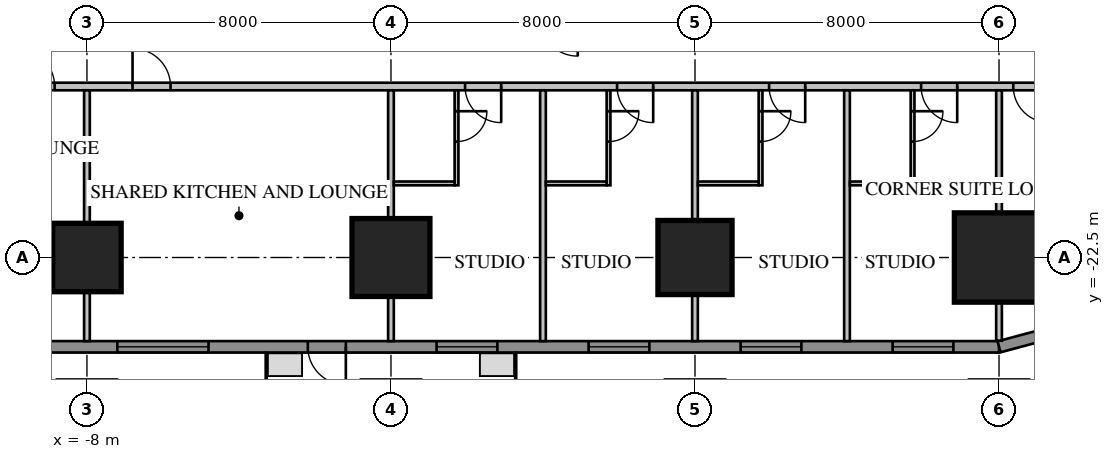
"""IFC4 building model, lengths in metres.
Left out: names, types, materials, properties, quantities, classifications, styles, units other than length and angle.
Written with IfcOpenShell. Run it as: python <this file> out.ifc"""

import sys

from ifc_helpers import new_model, si_unit, direction, frame, frame_2d, origin, origin_2d, place, context, subcontext, project, spatial, rectangle, extrude, element, fill, save


model = new_model("IFC4")
c1 = context("Model", 3, precision=1e-05, world=origin(), true_north=direction((0.0, 1.0)))
c2 = subcontext(c1, "Body", "Model", "MODEL_VIEW")
j1 = project(units=[si_unit("LENGTHUNIT", "METRE"), si_unit("PLANEANGLEUNIT", "RADIAN")], contexts=[c1])
p1 = place(None, origin())
s1 = spatial("IfcSite", under=j1, at=p1, CompositionType="ELEMENT")
p2 = place(p1, origin())
s2 = spatial("IfcBuilding", under=s1, at=p2, CompositionType="ELEMENT")
p3 = place(p2, frame((0.0, 0.0, 42.95)))
s3 = spatial("IfcBuildingStorey", under=s2, at=p3, CompositionType="ELEMENT", Elevation=42.95)
p4 = place(p3, frame((-8.0, -22.5, 0.0), z_axis=(0.0, 0.0, 1.0), x_axis=(1.0, 0.0, 0.0)))
e1 = element("IfcColumn", 1, at=p4, inside=s3, PredefinedType="COLUMN", context=c2, shape_type="SweptSolid", body=[
    extrude(rectangle(XDim=1.8, YDim=1.8, at=origin_2d()), origin(), (0.0, 0.0, 1.0), 3.85),
])
p5 = place(p3, frame((0.0, -22.5, 0.0), z_axis=(0.0, 0.0, 1.0), x_axis=(1.0, 0.0, 0.0)))
e2 = element("IfcColumn", 2, at=p5, inside=s3, PredefinedType="COLUMN", context=c2, shape_type="SweptSolid", body=[
    extrude(rectangle(XDim=2.05, YDim=2.05, at=origin_2d()), origin(), (0.0, 0.0, 1.0), 3.85),
])
p6 = place(p3, frame((8.0, -22.5, 0.0), z_axis=(0.0, 0.0, 1.0), x_axis=(1.0, 0.0, 0.0)))
e3 = element("IfcColumn", 3, at=p6, inside=s3, PredefinedType="COLUMN", context=c2, shape_type="SweptSolid", body=[
    extrude(rectangle(XDim=1.95, YDim=1.95, at=origin_2d()), origin(), (0.0, 0.0, 1.0), 3.85),
])
p7 = place(p3, frame((16.0, -22.5, 0.0), z_axis=(0.0, 0.0, 1.0), x_axis=(1.0, 0.0, 0.0)))
e4 = element("IfcColumn", 4, at=p7, inside=s3, PredefinedType="COLUMN", context=c2, shape_type="SweptSolid", body=[
    extrude(rectangle(XDim=2.35, YDim=2.35, at=origin_2d()), origin(), (0.0, 0.0, 1.0), 3.85),
])
p8 = place(p3, frame((-16.0, -24.85, 0.0), z_axis=(0.0, 0.0, 1.0), x_axis=(1.0, 0.0, 0.0)))
e5 = element("IfcWall", 5, at=p8, inside=s3, PredefinedType="SOLIDWALL", context=c2, shape_type="SweptSolid", body=[
    extrude(rectangle(XDim=32.0, YDim=0.3, at=frame_2d((16.0, 0.0))), origin(), (0.0, 0.0, 1.0), 3.65),
])
p9 = place(p8, frame((1.2, 0.0, 0.75)))
e6 = element("IfcOpeningElement", 6, at=p9, cuts=e5, PredefinedType="OPENING", context=c2, shape_type="SweptSolid", body=[
    extrude(rectangle(XDim=1.6, YDim=1.8, at=frame_2d((0.8, 0.9))), frame((0.0, 0.17, 0.0), z_axis=(0.0, -1.0, 0.0), x_axis=(1.0, 0.0, 0.0)), (0.0, 0.0, 1.0), 0.34),
])
p10 = place(p8, frame((5.2, 0.0, 0.75)))
e7 = element("IfcOpeningElement", 7, at=p10, cuts=e5, PredefinedType="OPENING", context=c2, shape_type="SweptSolid", body=[
    extrude(rectangle(XDim=1.6, YDim=1.8, at=frame_2d((0.8, 0.9))), frame((0.0, 0.17, 0.0), z_axis=(0.0, -1.0, 0.0), x_axis=(1.0, 0.0, 0.0)), (0.0, 0.0, 1.0), 0.34),
])
p11 = place(p8, frame((17.2, 0.0, 0.75)))
e8 = element("IfcOpeningElement", 8, at=p11, cuts=e5, PredefinedType="OPENING", context=c2, shape_type="SweptSolid", body=[
    extrude(rectangle(XDim=1.6, YDim=1.8, at=frame_2d((0.8, 0.9))), frame((0.0, 0.17, 0.0), z_axis=(0.0, -1.0, 0.0), x_axis=(1.0, 0.0, 0.0)), (0.0, 0.0, 1.0), 0.34),
])
p12 = place(p8, frame((21.2, 0.0, 0.75)))
e9 = element("IfcOpeningElement", 9, at=p12, cuts=e5, PredefinedType="OPENING", context=c2, shape_type="SweptSolid", body=[
    extrude(rectangle(XDim=1.6, YDim=1.8, at=frame_2d((0.8, 0.9))), frame((0.0, 0.17, 0.0), z_axis=(0.0, -1.0, 0.0), x_axis=(1.0, 0.0, 0.0)), (0.0, 0.0, 1.0), 0.34),
])
p13 = place(p8, frame((25.2, 0.0, 0.75)))
e10 = element("IfcOpeningElement", 10, at=p13, cuts=e5, PredefinedType="OPENING", context=c2, shape_type="SweptSolid", body=[
    extrude(rectangle(XDim=1.6, YDim=1.8, at=frame_2d((0.8, 0.9))), frame((0.0, 0.17, 0.0), z_axis=(0.0, -1.0, 0.0), x_axis=(1.0, 0.0, 0.0)), (0.0, 0.0, 1.0), 0.34),
])
p14 = place(p8, frame((29.2, 0.0, 0.75)))
e11 = element("IfcOpeningElement", 11, at=p14, cuts=e5, PredefinedType="OPENING", context=c2, shape_type="SweptSolid", body=[
    extrude(rectangle(XDim=1.6, YDim=1.8, at=frame_2d((0.8, 0.9))), frame((0.0, 0.17, 0.0), z_axis=(0.0, -1.0, 0.0), x_axis=(1.0, 0.0, 0.0)), (0.0, 0.0, 1.0), 0.34),
])
p15 = place(p8, frame((8.8, 0.0, 0.75)))
e12 = element("IfcOpeningElement", 12, at=p15, cuts=e5, PredefinedType="OPENING", context=c2, shape_type="SweptSolid", body=[
    extrude(rectangle(XDim=2.4, YDim=1.8, at=frame_2d((1.2, 0.9))), frame((0.0, 0.17, 0.0), z_axis=(0.0, -1.0, 0.0), x_axis=(1.0, 0.0, 0.0)), (0.0, 0.0, 1.0), 0.34),
])
p16 = place(p8, frame((13.812, 0.0, 0.0)))
e13 = element("IfcOpeningElement", 13, at=p16, cuts=e5, PredefinedType="OPENING", context=c2, shape_type="SweptSolid", body=[
    extrude(rectangle(XDim=1.0, YDim=2.4, at=frame_2d((0.5, 1.2))), frame((0.0, 0.17, 0.0), z_axis=(0.0, -1.0, 0.0), x_axis=(1.0, 0.0, 0.0)), (0.0, 0.0, 1.0), 0.34),
])
p17 = place(p3, frame((16.0, -24.85, 0.0), z_axis=(0.0, 0.0, 1.0), x_axis=(0.965920218567, 0.258839972501, 0.0)))
e14 = element("IfcWall", 14, at=p17, inside=s3, PredefinedType="SOLIDWALL", context=c2, shape_type="SweptSolid", body=[
    extrude(rectangle(XDim=4.581, YDim=0.3, at=frame_2d((2.291, 0.0))), origin(), (0.0, 0.0, 1.0), 3.65),
])
p18 = place(p3, frame((-18.0, -18.0, 0.0), z_axis=(0.0, 0.0, 1.0), x_axis=(1.0, 0.0, 0.0)))
e15 = element("IfcWall", 15, at=p18, inside=s3, PredefinedType="PARTITIONING", context=c2, shape_type="SweptSolid", body=[
    extrude(rectangle(XDim=36.0, YDim=0.2, at=frame_2d((18.0, 0.0))), origin(), (0.0, 0.0, 1.0), 3.65),
])
p19 = place(p18, frame((0.375, 0.0, 0.0)))
e16 = element("IfcOpeningElement", 16, at=p19, cuts=e15, PredefinedType="OPENING", context=c2, shape_type="SweptSolid", body=[
    extrude(rectangle(XDim=1.0, YDim=2.1, at=frame_2d((0.5, 1.05))), frame((0.0, 0.12, 0.0), z_axis=(0.0, -1.0, 0.0), x_axis=(1.0, 0.0, 0.0)), (0.0, 0.0, 1.0), 0.24),
])
p20 = place(p18, frame((2.45, 0.0, 0.0)))
e17 = element("IfcOpeningElement", 17, at=p20, cuts=e15, PredefinedType="OPENING", context=c2, shape_type="SweptSolid", body=[
    extrude(rectangle(XDim=0.8, YDim=2.1, at=frame_2d((0.4, 1.05))), frame((0.0, 0.12, 0.0), z_axis=(0.0, -1.0, 0.0), x_axis=(1.0, 0.0, 0.0)), (0.0, 0.0, 1.0), 0.24),
])
p21 = place(p18, frame((4.05, 0.0, 0.0)))
e18 = element("IfcOpeningElement", 18, at=p21, cuts=e15, PredefinedType="OPENING", context=c2, shape_type="SweptSolid", body=[
    extrude(rectangle(XDim=1.0, YDim=2.1, at=frame_2d((0.5, 1.05))), frame((0.0, 0.12, 0.0), z_axis=(0.0, -1.0, 0.0), x_axis=(1.0, 0.0, 0.0)), (0.0, 0.0, 1.0), 0.24),
])
p22 = place(p18, frame((6.45, 0.0, 0.0)))
e19 = element("IfcOpeningElement", 19, at=p22, cuts=e15, PredefinedType="OPENING", context=c2, shape_type="SweptSolid", body=[
    extrude(rectangle(XDim=0.9, YDim=2.1, at=frame_2d((0.45, 1.05))), frame((0.0, 0.12, 0.0), z_axis=(0.0, -1.0, 0.0), x_axis=(1.0, 0.0, 0.0)), (0.0, 0.0, 1.0), 0.24),
])
p23 = place(p18, frame((8.15, 0.0, 0.0)))
e20 = element("IfcOpeningElement", 20, at=p23, cuts=e15, PredefinedType="OPENING", context=c2, shape_type="SweptSolid", body=[
    extrude(rectangle(XDim=1.0, YDim=2.1, at=frame_2d((0.5, 1.05))), frame((0.0, 0.12, 0.0), z_axis=(0.0, -1.0, 0.0), x_axis=(1.0, 0.0, 0.0)), (0.0, 0.0, 1.0), 0.24),
])
p24 = place(p18, frame((19.95, 0.0, 0.0)))
e21 = element("IfcOpeningElement", 21, at=p24, cuts=e15, PredefinedType="OPENING", context=c2, shape_type="SweptSolid", body=[
    extrude(rectangle(XDim=0.95, YDim=2.1, at=frame_2d((0.475, 1.05))), frame((0.0, 0.12, 0.0), z_axis=(0.0, -1.0, 0.0), x_axis=(1.0, 0.0, 0.0)), (0.0, 0.0, 1.0), 0.24),
])
p25 = place(p18, frame((23.95, 0.0, 0.0)))
e22 = element("IfcOpeningElement", 22, at=p25, cuts=e15, PredefinedType="OPENING", context=c2, shape_type="SweptSolid", body=[
    extrude(rectangle(XDim=0.95, YDim=2.1, at=frame_2d((0.475, 1.05))), frame((0.0, 0.12, 0.0), z_axis=(0.0, -1.0, 0.0), x_axis=(1.0, 0.0, 0.0)), (0.0, 0.0, 1.0), 0.24),
])
p26 = place(p18, frame((27.95, 0.0, 0.0)))
e23 = element("IfcOpeningElement", 23, at=p26, cuts=e15, PredefinedType="OPENING", context=c2, shape_type="SweptSolid", body=[
    extrude(rectangle(XDim=0.95, YDim=2.1, at=frame_2d((0.475, 1.05))), frame((0.0, 0.12, 0.0), z_axis=(0.0, -1.0, 0.0), x_axis=(1.0, 0.0, 0.0)), (0.0, 0.0, 1.0), 0.24),
])
p27 = place(p18, frame((31.95, 0.0, 0.0)))
e24 = element("IfcOpeningElement", 24, at=p27, cuts=e15, PredefinedType="OPENING", context=c2, shape_type="SweptSolid", body=[
    extrude(rectangle(XDim=0.95, YDim=2.1, at=frame_2d((0.475, 1.05))), frame((0.0, 0.12, 0.0), z_axis=(0.0, -1.0, 0.0), x_axis=(1.0, 0.0, 0.0)), (0.0, 0.0, 1.0), 0.24),
])
p28 = place(p18, frame((34.375, 0.0, 0.0)))
e25 = element("IfcOpeningElement", 25, at=p28, cuts=e15, PredefinedType="OPENING", context=c2, shape_type="SweptSolid", body=[
    extrude(rectangle(XDim=0.95, YDim=2.1, at=frame_2d((0.475, 1.05))), frame((0.0, 0.12, 0.0), z_axis=(0.0, -1.0, 0.0), x_axis=(1.0, 0.0, 0.0)), (0.0, 0.0, 1.0), 0.24),
])
p29 = place(p18, frame((11.2, 0.0, 0.0)))
e26 = element("IfcOpeningElement", 26, at=p29, cuts=e15, PredefinedType="OPENING", context=c2, shape_type="SweptSolid", body=[
    extrude(rectangle(XDim=1.0, YDim=2.1, at=frame_2d((0.5, 1.05))), frame((0.0, 0.12, 0.0), z_axis=(0.0, -1.0, 0.0), x_axis=(1.0, 0.0, 0.0)), (0.0, 0.0, 1.0), 0.24),
])
p30 = place(p3, frame((-8.0, -18.1, 0.0), z_axis=(0.0, 0.0, 1.0), x_axis=(0.0, -1.0, 0.0)))
e27 = element("IfcWall", 27, at=p30, inside=s3, PredefinedType="PARTITIONING", context=c2, shape_type="SweptSolid", body=[
    extrude(rectangle(XDim=6.6, YDim=0.15, at=frame_2d((3.3, 0.0))), origin(), (0.0, 0.0, 1.0), 3.65),
])
p31 = place(p3, frame((0.0, -18.1, 0.0), z_axis=(0.0, 0.0, 1.0), x_axis=(0.0, -1.0, 0.0)))
e28 = element("IfcWall", 28, at=p31, inside=s3, PredefinedType="PARTITIONING", context=c2, shape_type="SweptSolid", body=[
    extrude(rectangle(XDim=6.6, YDim=0.15, at=frame_2d((3.3, 0.0))), origin(), (0.0, 0.0, 1.0), 2.809),
])
for number, where, z_axis, x_axis in (
    (29, (4.0, -18.1, 0.0), (0.0, 0.0, 1.0), (0.0, -1.0, 0.0)),
    (30, (8.0, -18.1, 0.0), (0.0, 0.0, 1.0), (0.0, -1.0, 0.0)),
    (31, (12.0, -18.1, 0.0), (0.0, 0.0, 1.0), (0.0, -1.0, 0.0)),
):
    element("IfcWall", number, at=place(p3, frame(where, z_axis=z_axis, x_axis=x_axis)), inside=s3, PredefinedType="PARTITIONING", context=c2, shape_type="SweptSolid", body=[
        extrude(rectangle(XDim=6.6, YDim=0.15, at=frame_2d((3.3, 0.0))), origin(), (0.0, 0.0, 1.0), 3.65),
    ])
p32 = place(p3, frame((16.0, -18.1, 0.0), z_axis=(0.0, 0.0, 1.0), x_axis=(0.0, -1.0, 0.0)))
e32 = element("IfcWall", 32, at=p32, inside=s3, PredefinedType="PARTITIONING", context=c2, shape_type="SweptSolid", body=[
    extrude(rectangle(XDim=6.589, YDim=0.15, at=frame_2d((3.295, 0.0))), origin(), (0.0, 0.0, 1.0), 3.65),
])
p33 = place(p3, frame((1.725, -18.1, 0.0), z_axis=(0.0, 0.0, 1.0), x_axis=(0.0, -1.0, 0.0)))
e33 = element("IfcWall", 33, at=p33, inside=s3, PredefinedType="PARTITIONING", context=c2, shape_type="SweptSolid", body=[
    extrude(rectangle(XDim=2.5, YDim=0.1, at=frame_2d((1.25, 0.0))), origin(), (0.0, 0.0, 1.0), 3.65),
])
p34 = place(p33, frame((0.55, 0.0, 0.0)))
e34 = element("IfcOpeningElement", 34, at=p34, cuts=e33, PredefinedType="OPENING", context=c2, shape_type="SweptSolid", body=[
    extrude(rectangle(XDim=0.8, YDim=2.1, at=frame_2d((0.4, 1.05))), frame((0.0, 0.07, 0.0), z_axis=(0.0, -1.0, 0.0), x_axis=(1.0, 0.0, 0.0)), (0.0, 0.0, 1.0), 0.14),
])
p35 = place(p3, frame((0.075, -20.55, 0.0), z_axis=(0.0, 0.0, 1.0), x_axis=(1.0, 0.0, 0.0)))
e35 = element("IfcWall", 35, at=p35, inside=s3, PredefinedType="PARTITIONING", context=c2, shape_type="SweptSolid", body=[
    extrude(rectangle(XDim=1.6, YDim=0.1, at=frame_2d((0.8, 0.0))), origin(), (0.0, 0.0, 1.0), 3.65),
])
p36 = place(p3, frame((5.725, -18.1, 0.0), z_axis=(0.0, 0.0, 1.0), x_axis=(0.0, -1.0, 0.0)))
e36 = element("IfcWall", 36, at=p36, inside=s3, PredefinedType="PARTITIONING", context=c2, shape_type="SweptSolid", body=[
    extrude(rectangle(XDim=2.5, YDim=0.1, at=frame_2d((1.25, 0.0))), origin(), (0.0, 0.0, 1.0), 3.65),
])
p37 = place(p36, frame((0.55, 0.0, 0.0)))
e37 = element("IfcOpeningElement", 37, at=p37, cuts=e36, PredefinedType="OPENING", context=c2, shape_type="SweptSolid", body=[
    extrude(rectangle(XDim=0.8, YDim=2.1, at=frame_2d((0.4, 1.05))), frame((0.0, 0.07, 0.0), z_axis=(0.0, -1.0, 0.0), x_axis=(1.0, 0.0, 0.0)), (0.0, 0.0, 1.0), 0.14),
])
p38 = place(p3, frame((4.075, -20.55, 0.0), z_axis=(0.0, 0.0, 1.0), x_axis=(1.0, 0.0, 0.0)))
e38 = element("IfcWall", 38, at=p38, inside=s3, PredefinedType="PARTITIONING", context=c2, shape_type="SweptSolid", body=[
    extrude(rectangle(XDim=1.6, YDim=0.1, at=frame_2d((0.8, 0.0))), origin(), (0.0, 0.0, 1.0), 3.65),
])
p39 = place(p3, frame((9.725, -18.1, 0.0), z_axis=(0.0, 0.0, 1.0), x_axis=(0.0, -1.0, 0.0)))
e39 = element("IfcWall", 39, at=p39, inside=s3, PredefinedType="PARTITIONING", context=c2, shape_type="SweptSolid", body=[
    extrude(rectangle(XDim=2.5, YDim=0.1, at=frame_2d((1.25, 0.0))), origin(), (0.0, 0.0, 1.0), 3.65),
])
p40 = place(p39, frame((0.55, 0.0, 0.0)))
e40 = element("IfcOpeningElement", 40, at=p40, cuts=e39, PredefinedType="OPENING", context=c2, shape_type="SweptSolid", body=[
    extrude(rectangle(XDim=0.8, YDim=2.1, at=frame_2d((0.4, 1.05))), frame((0.0, 0.07, 0.0), z_axis=(0.0, -1.0, 0.0), x_axis=(1.0, 0.0, 0.0)), (0.0, 0.0, 1.0), 0.14),
])
p41 = place(p3, frame((8.075, -20.55, 0.0), z_axis=(0.0, 0.0, 1.0), x_axis=(1.0, 0.0, 0.0)))
e41 = element("IfcWall", 41, at=p41, inside=s3, PredefinedType="PARTITIONING", context=c2, shape_type="SweptSolid", body=[
    extrude(rectangle(XDim=1.6, YDim=0.1, at=frame_2d((0.8, 0.0))), origin(), (0.0, 0.0, 1.0), 3.65),
])
p42 = place(p3, frame((13.725, -18.1, 0.0), z_axis=(0.0, 0.0, 1.0), x_axis=(0.0, -1.0, 0.0)))
e42 = element("IfcWall", 42, at=p42, inside=s3, PredefinedType="PARTITIONING", context=c2, shape_type="SweptSolid", body=[
    extrude(rectangle(XDim=2.5, YDim=0.1, at=frame_2d((1.25, 0.0))), origin(), (0.0, 0.0, 1.0), 3.65),
])
p43 = place(p42, frame((0.55, 0.0, 0.0)))
e43 = element("IfcOpeningElement", 43, at=p43, cuts=e42, PredefinedType="OPENING", context=c2, shape_type="SweptSolid", body=[
    extrude(rectangle(XDim=0.8, YDim=2.1, at=frame_2d((0.4, 1.05))), frame((0.0, 0.07, 0.0), z_axis=(0.0, -1.0, 0.0), x_axis=(1.0, 0.0, 0.0)), (0.0, 0.0, 1.0), 0.14),
])
p44 = place(p3, frame((12.075, -20.55, 0.0), z_axis=(0.0, 0.0, 1.0), x_axis=(1.0, 0.0, 0.0)))
e44 = element("IfcWall", 44, at=p44, inside=s3, PredefinedType="PARTITIONING", context=c2, shape_type="SweptSolid", body=[
    extrude(rectangle(XDim=1.6, YDim=0.1, at=frame_2d((0.8, 0.0))), origin(), (0.0, 0.0, 1.0), 3.65),
])
p45 = place(p11, origin())
e45 = element("IfcWindow", 45, at=p45, inside=s3, PartitioningType="SINGLE_PANEL", PredefinedType="WINDOW", context=c2, shape_type="SweptSolid", body=[
    extrude(rectangle(XDim=1.6, YDim=1.8, at=frame_2d((0.8, 0.9))), frame((0.0, 0.03, 0.0), z_axis=(0.0, -1.0, 0.0), x_axis=(1.0, 0.0, 0.0)), (0.0, 0.0, 1.0), 0.06),
])
fill(e8, e45)
p46 = place(p12, origin())
e46 = element("IfcWindow", 46, at=p46, inside=s3, PartitioningType="SINGLE_PANEL", PredefinedType="WINDOW", context=c2, shape_type="SweptSolid", body=[
    extrude(rectangle(XDim=1.6, YDim=1.8, at=frame_2d((0.8, 0.9))), frame((0.0, 0.03, 0.0), z_axis=(0.0, -1.0, 0.0), x_axis=(1.0, 0.0, 0.0)), (0.0, 0.0, 1.0), 0.06),
])
fill(e9, e46)
p47 = place(p13, origin())
e47 = element("IfcWindow", 47, at=p47, inside=s3, PartitioningType="SINGLE_PANEL", PredefinedType="WINDOW", context=c2, shape_type="SweptSolid", body=[
    extrude(rectangle(XDim=1.6, YDim=1.8, at=frame_2d((0.8, 0.9))), frame((0.0, 0.03, 0.0), z_axis=(0.0, -1.0, 0.0), x_axis=(1.0, 0.0, 0.0)), (0.0, 0.0, 1.0), 0.06),
])
fill(e10, e47)
p48 = place(p14, origin())
e48 = element("IfcWindow", 48, at=p48, inside=s3, PartitioningType="SINGLE_PANEL", PredefinedType="WINDOW", context=c2, shape_type="SweptSolid", body=[
    extrude(rectangle(XDim=1.6, YDim=1.8, at=frame_2d((0.8, 0.9))), frame((0.0, 0.03, 0.0), z_axis=(0.0, -1.0, 0.0), x_axis=(1.0, 0.0, 0.0)), (0.0, 0.0, 1.0), 0.06),
])
fill(e11, e48)
p49 = place(p15, origin())
e49 = element("IfcWindow", 49, at=p49, inside=s3, PartitioningType="SINGLE_PANEL", PredefinedType="WINDOW", context=c2, shape_type="SweptSolid", body=[
    extrude(rectangle(XDim=2.4, YDim=1.8, at=frame_2d((1.2, 0.9))), frame((0.0, 0.03, 0.0), z_axis=(0.0, -1.0, 0.0), x_axis=(1.0, 0.0, 0.0)), (0.0, 0.0, 1.0), 0.06),
])
fill(e12, e49)
p50 = place(p16, origin())
e50 = element("IfcDoor", 50, at=p50, inside=s3, OperationType="SINGLE_SWING_RIGHT", PredefinedType="DOOR", context=c2, shape_type="SweptSolid", body=[
    extrude(rectangle(XDim=1.0, YDim=2.4, at=frame_2d((0.5, 1.2))), frame((0.0, 0.025, 0.0), z_axis=(0.0, -1.0, 0.0), x_axis=(1.0, 0.0, 0.0)), (0.0, 0.0, 1.0), 0.05),
])
fill(e13, e50)
p51 = place(p23, origin())
e51 = element("IfcDoor", 51, at=p51, inside=s3, OperationType="SINGLE_SWING_LEFT", PredefinedType="DOOR", context=c2, shape_type="SweptSolid", body=[
    extrude(rectangle(XDim=1.0, YDim=2.1, at=frame_2d((0.5, 1.05))), frame((0.0, 0.025, 0.0), z_axis=(0.0, -1.0, 0.0), x_axis=(1.0, 0.0, 0.0)), (0.0, 0.0, 1.0), 0.05),
])
fill(e20, e51)
p52 = place(p24, origin())
e52 = element("IfcDoor", 52, at=p52, inside=s3, OperationType="SINGLE_SWING_RIGHT", PredefinedType="DOOR", context=c2, shape_type="SweptSolid", body=[
    extrude(rectangle(XDim=0.95, YDim=2.1, at=frame_2d((0.475, 1.05))), frame((0.0, 0.025, 0.0), z_axis=(0.0, -1.0, 0.0), x_axis=(1.0, 0.0, 0.0)), (0.0, 0.0, 1.0), 0.05),
])
fill(e21, e52)
p53 = place(p34, origin())
e53 = element("IfcDoor", 53, at=p53, inside=s3, OperationType="SINGLE_SWING_LEFT", PredefinedType="DOOR", context=c2, shape_type="SweptSolid", body=[
    extrude(rectangle(XDim=0.8, YDim=2.1, at=frame_2d((0.4, 1.05))), frame((0.0, 0.025, 0.0), z_axis=(0.0, -1.0, 0.0), x_axis=(1.0, 0.0, 0.0)), (0.0, 0.0, 1.0), 0.05),
])
fill(e34, e53)
p54 = place(p25, origin())
e54 = element("IfcDoor", 54, at=p54, inside=s3, OperationType="SINGLE_SWING_RIGHT", PredefinedType="DOOR", context=c2, shape_type="SweptSolid", body=[
    extrude(rectangle(XDim=0.95, YDim=2.1, at=frame_2d((0.475, 1.05))), frame((0.0, 0.025, 0.0), z_axis=(0.0, -1.0, 0.0), x_axis=(1.0, 0.0, 0.0)), (0.0, 0.0, 1.0), 0.05),
])
fill(e22, e54)
p55 = place(p37, origin())
e55 = element("IfcDoor", 55, at=p55, inside=s3, OperationType="SINGLE_SWING_LEFT", PredefinedType="DOOR", context=c2, shape_type="SweptSolid", body=[
    extrude(rectangle(XDim=0.8, YDim=2.1, at=frame_2d((0.4, 1.05))), frame((0.0, 0.025, 0.0), z_axis=(0.0, -1.0, 0.0), x_axis=(1.0, 0.0, 0.0)), (0.0, 0.0, 1.0), 0.05),
])
fill(e37, e55)
p56 = place(p26, origin())
e56 = element("IfcDoor", 56, at=p56, inside=s3, OperationType="SINGLE_SWING_RIGHT", PredefinedType="DOOR", context=c2, shape_type="SweptSolid", body=[
    extrude(rectangle(XDim=0.95, YDim=2.1, at=frame_2d((0.475, 1.05))), frame((0.0, 0.025, 0.0), z_axis=(0.0, -1.0, 0.0), x_axis=(1.0, 0.0, 0.0)), (0.0, 0.0, 1.0), 0.05),
])
fill(e23, e56)
p57 = place(p40, origin())
e57 = element("IfcDoor", 57, at=p57, inside=s3, OperationType="SINGLE_SWING_LEFT", PredefinedType="DOOR", context=c2, shape_type="SweptSolid", body=[
    extrude(rectangle(XDim=0.8, YDim=2.1, at=frame_2d((0.4, 1.05))), frame((0.0, 0.025, 0.0), z_axis=(0.0, -1.0, 0.0), x_axis=(1.0, 0.0, 0.0)), (0.0, 0.0, 1.0), 0.05),
])
fill(e40, e57)
p58 = place(p27, origin())
e58 = element("IfcDoor", 58, at=p58, inside=s3, OperationType="SINGLE_SWING_RIGHT", PredefinedType="DOOR", context=c2, shape_type="SweptSolid", body=[
    extrude(rectangle(XDim=0.95, YDim=2.1, at=frame_2d((0.475, 1.05))), frame((0.0, 0.025, 0.0), z_axis=(0.0, -1.0, 0.0), x_axis=(1.0, 0.0, 0.0)), (0.0, 0.0, 1.0), 0.05),
])
fill(e24, e58)
p59 = place(p43, origin())
e59 = element("IfcDoor", 59, at=p59, inside=s3, OperationType="SINGLE_SWING_LEFT", PredefinedType="DOOR", context=c2, shape_type="SweptSolid", body=[
    extrude(rectangle(XDim=0.8, YDim=2.1, at=frame_2d((0.4, 1.05))), frame((0.0, 0.025, 0.0), z_axis=(0.0, -1.0, 0.0), x_axis=(1.0, 0.0, 0.0)), (0.0, 0.0, 1.0), 0.05),
])
fill(e43, e59)
p60 = place(p28, origin())
e60 = element("IfcDoor", 60, at=p60, inside=s3, OperationType="SINGLE_SWING_RIGHT", PredefinedType="DOOR", context=c2, shape_type="SweptSolid", body=[
    extrude(rectangle(XDim=0.95, YDim=2.1, at=frame_2d((0.475, 1.05))), frame((0.0, 0.025, 0.0), z_axis=(0.0, -1.0, 0.0), x_axis=(1.0, 0.0, 0.0)), (0.0, 0.0, 1.0), 0.05),
])
fill(e25, e60)
p61 = place(p29, origin())
e61 = element("IfcDoor", 61, at=p61, inside=s3, OperationType="SINGLE_SWING_LEFT", PredefinedType="DOOR", context=c2, shape_type="SweptSolid", body=[
    extrude(rectangle(XDim=1.0, YDim=2.1, at=frame_2d((0.5, 1.05))), frame((0.0, 0.025, 0.0), z_axis=(0.0, -1.0, 0.0), x_axis=(1.0, 0.0, 0.0)), (0.0, 0.0, 1.0), 0.05),
])
fill(e26, e61)
save(model, sys.argv[1])
